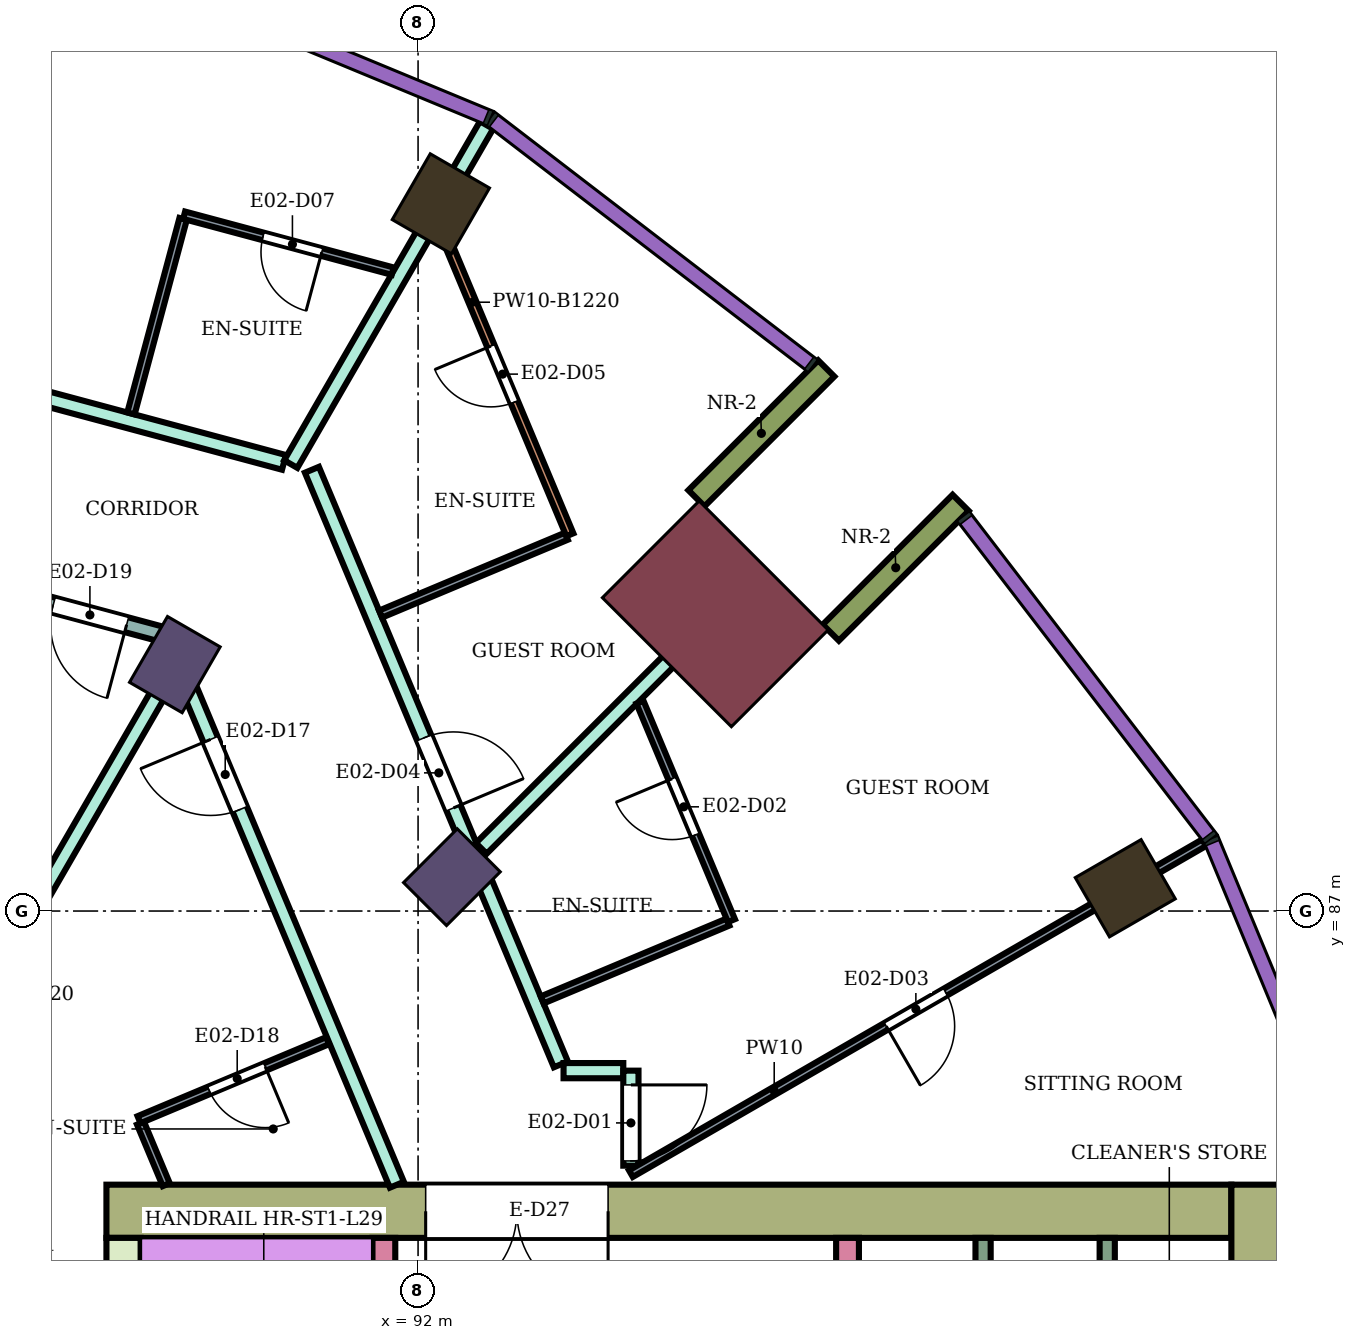
"""IFC4 building model, lengths in metres.
Left out: names, types, materials, properties, quantities, classifications, styles, units other than length and angle.
Written with IfcOpenShell. Run it as: python <this file> out.ifc"""

import sys

from ifc_helpers import new_model, si_unit, direction, frame, frame_2d, origin, origin_2d, place, context, subcontext, project, spatial, rectangle, extrude, element, fill, save


model = new_model("IFC4")
c1 = context("Model", 3, precision=1e-05, world=origin(), true_north=direction((0.0, 1.0)))
c2 = subcontext(c1, "Body", "Model", "MODEL_VIEW")
j1 = project(units=[si_unit("LENGTHUNIT", "METRE"), si_unit("PLANEANGLEUNIT", "RADIAN")], contexts=[c1])
p1 = place(None, origin())
s1 = spatial("IfcSite", under=j1, at=p1, CompositionType="ELEMENT")
p2 = place(p1, origin())
s2 = spatial("IfcBuilding", under=s1, at=p2, CompositionType="ELEMENT")
p3 = place(p2, frame((0.0, 0.0, 126.3)))
s3 = spatial("IfcBuildingStorey", under=s2, at=p3, CompositionType="ELEMENT", Elevation=126.3)
for number, where, z_axis, x_axis in (
    (1, (101.304, 87.3, 0.0), (0.0, 0.0, 1.0), (0.866, 0.5, 0.0)),
    (2, (92.3, 96.304, 0.0), (0.0, 0.0, 1.0), (0.5, 0.866, 0.0)),
):
    element("IfcColumn", number, at=place(p3, frame(where, z_axis=z_axis, x_axis=x_axis)), inside=s3, PredefinedType="COLUMN", context=c2, shape_type="SweptSolid", body=[
        extrude(rectangle(XDim=1.0, YDim=0.9, at=origin_2d()), origin(), (0.0, 0.0, 1.0), 3.9),
    ])
for number, where, z_axis, x_axis in (
    (3, (92.445, 87.445, 0.0), (0.0, 0.0, 1.0), (0.707, 0.707, 0.0)),
    (4, (88.8, 90.242, 0.0), (0.0, 0.0, 1.0), (0.5, 0.866, 0.0)),
):
    element("IfcColumn", number, at=place(p3, frame(where, z_axis=z_axis, x_axis=x_axis)), inside=s3, PredefinedType="COLUMN", context=c2, shape_type="SweptSolid", body=[
        extrude(rectangle(XDim=1.0, YDim=0.8, at=origin_2d()), origin(), (0.0, 0.0, 1.0), 3.9),
    ])
p4 = place(p3, frame((95.91, 90.91, 0.0), z_axis=(0.0, 0.0, 1.0), x_axis=(0.707106781187, 0.707106781187, 0.0)))
e5 = element("IfcColumn", 5, at=p4, inside=s3, PredefinedType="COLUMN", context=c2, shape_type="SweptSolid", body=[
    extrude(rectangle(XDim=1.8, YDim=2.4, at=origin_2d()), origin(), (0.0, 0.0, 1.0), 3.9),
])
p5 = place(p3, frame((87.9, 83.05, 0.0), z_axis=(0.0, 0.0, 1.0), x_axis=(1.0, 0.0, 0.0)))
e6 = element("IfcWall", 6, at=p5, inside=s3, PredefinedType="SHEAR", context=c2, shape_type="SweptSolid", body=[
    extrude(rectangle(XDim=14.8, YDim=0.7, at=frame_2d((7.4, 0.0))), origin(), (0.0, 0.0, 1.0), 3.58),
])
p6 = place(p5, frame((4.2, 0.0, 0.0)))
e7 = element("IfcOpeningElement", 7, at=p6, cuts=e6, PredefinedType="OPENING", context=c2, shape_type="SweptSolid", body=[
    extrude(rectangle(XDim=2.4, YDim=2.4, at=frame_2d((1.2, 1.2))), frame((0.0, 0.36, 0.0), z_axis=(0.0, -1.0, 0.0), x_axis=(1.0, 0.0, 0.0)), (0.0, 0.0, 1.0), 0.72),
])
p7 = place(p3, frame((88.125, 75.0, 0.0), z_axis=(0.0, 0.0, 1.0), x_axis=(0.0, 1.0, 0.0)))
e8 = element("IfcWall", 8, at=p7, inside=s3, PredefinedType="SHEAR", context=c2, shape_type="SweptSolid", body=[
    extrude(rectangle(XDim=7.7, YDim=0.45, at=frame_2d((3.85, 0.0))), origin(), (0.0, 0.0, 1.0), 3.58),
])
p8 = place(p3, frame((103.05, 66.6, 0.0), z_axis=(0.0, 0.0, 1.0), x_axis=(0.0, 1.0, 0.0)))
e9 = element("IfcWall", 9, at=p8, inside=s3, PredefinedType="SHEAR", context=c2, shape_type="SweptSolid", body=[
    extrude(rectangle(XDim=16.8, YDim=0.7, at=frame_2d((8.4, 0.0))), origin(), (0.0, 0.0, 1.0), 3.58),
])
p9 = place(p3, frame((91.55, 75.0, 0.0), z_axis=(0.0, 0.0, 1.0), x_axis=(0.0, 1.0, 0.0)))
e10 = element("IfcWall", 10, at=p9, inside=s3, PredefinedType="SHEAR", context=c2, shape_type="SweptSolid", body=[
    extrude(rectangle(XDim=7.7, YDim=0.3, at=frame_2d((3.85, 0.0))), origin(), (0.0, 0.0, 1.0), 3.58),
])
p10 = place(p9, frame((1.85, 0.0, 0.0)))
e11 = element("IfcOpeningElement", 11, at=p10, cuts=e10, PredefinedType="OPENING", context=c2, shape_type="SweptSolid", body=[
    extrude(rectangle(XDim=0.9, YDim=2.1, at=frame_2d((0.45, 1.05))), frame((0.0, 0.16, 0.0), z_axis=(0.0, -1.0, 0.0), x_axis=(1.0, 0.0, 0.0)), (0.0, 0.0, 1.0), 0.32),
])
p11 = place(p3, frame((97.65, 79.55, 0.0), z_axis=(0.0, 0.0, 1.0), x_axis=(0.0, 1.0, 0.0)))
e12 = element("IfcWall", 12, at=p11, inside=s3, PredefinedType="SHEAR", context=c2, shape_type="SweptSolid", body=[
    extrude(rectangle(XDim=3.15, YDim=0.3, at=frame_2d((1.575, 0.0))), origin(), (0.0, 0.0, 1.0), 3.58),
])
for number, where, z_axis, x_axis in (
    (13, (97.43, 90.662, 0.0), (0.0, 0.0, 1.0), (0.707, 0.707, 0.0)),
    (14, (95.662, 92.43, 0.0), (0.0, 0.0, 1.0), (0.707, 0.707, 0.0)),
):
    element("IfcWall", number, at=place(p3, frame(where, z_axis=z_axis, x_axis=x_axis)), inside=s3, PredefinedType="NOTDEFINED", context=c2, shape_type="SweptSolid", body=[
        extrude(rectangle(XDim=2.416, YDim=0.3, at=frame_2d((1.208, 0.0))), origin(), (0.0, 0.0, 1.0), 3.9),
    ])
p12 = place(p3, frame((80.0, 92.954, 0.0), z_axis=(0.0, 0.0, 1.0), x_axis=(0.96592536278, -0.258820774936, 0.0)))
e15 = element("IfcWall", 15, at=p12, inside=s3, PredefinedType="PARTITIONING", context=c2, shape_type="SweptSolid", body=[
    extrude(rectangle(XDim=8.934, YDim=0.2, at=frame_2d((4.467, 0.0))), origin(), (0.0, 0.0, 1.0), 3.08),
])
p13 = place(p12, frame((7.454, 0.0, 0.0)))
e16 = element("IfcOpeningElement", 16, at=p13, cuts=e15, PredefinedType="OPENING", context=c2, shape_type="SweptSolid", body=[
    extrude(rectangle(XDim=1.0, YDim=2.1, at=frame_2d((0.5, 1.05))), frame((0.0, 0.11, 0.0), z_axis=(0.0, -1.0, 0.0), x_axis=(1.0, 0.0, 0.0)), (0.0, 0.0, 1.0), 0.22),
])
p14 = place(p3, frame((80.0, 95.648, 0.0), z_axis=(0.0, 0.0, 1.0), x_axis=(0.965852259202, -0.259093445292, 0.0)))
e17 = element("IfcWall", 17, at=p14, inside=s3, PredefinedType="PARTITIONING", context=c2, shape_type="SweptSolid", body=[
    extrude(rectangle(XDim=10.597, YDim=0.2, at=frame_2d((5.298, 0.0))), origin(), (0.0, 0.0, 1.0), 3.45),
])
p15 = place(p14, frame((1.0, 0.0, 0.0)))
e18 = element("IfcOpeningElement", 18, at=p15, cuts=e17, PredefinedType="OPENING", context=c2, shape_type="SweptSolid", body=[
    extrude(rectangle(XDim=1.0, YDim=2.1, at=frame_2d((0.5, 1.05))), frame((0.0, 0.11, 0.0), z_axis=(0.0, -1.0, 0.0), x_axis=(1.0, 0.0, 0.0)), (0.0, 0.0, 1.0), 0.22),
])
p16 = place(p3, frame((83.85, 81.667, 0.0), z_axis=(0.0, 0.0, 1.0), x_axis=(0.500092047414, 0.865972253663, 0.0)))
e19 = element("IfcWall", 19, at=p16, inside=s3, PredefinedType="PARTITIONING", context=c2, shape_type="SweptSolid", body=[
    extrude(rectangle(XDim=9.778, YDim=0.2, at=frame_2d((4.889, 0.0))), origin(), (0.0, 0.0, 1.0), 3.45),
])
p17 = place(p3, frame((88.698, 90.624, 0.0), z_axis=(0.0, 0.0, 1.0), x_axis=(0.386027055918, -0.922487459047, 0.0)))
e20 = element("IfcWall", 20, at=p17, inside=s3, PredefinedType="PARTITIONING", context=c2, shape_type="SweptSolid", body=[
    extrude(rectangle(XDim=7.832, YDim=0.2, at=frame_2d((3.916, 0.0))), origin(), (0.0, 0.0, 1.0), 3.45),
])
p18 = place(p17, frame((1.482, 0.0, 0.0)))
e21 = element("IfcOpeningElement", 21, at=p18, cuts=e20, PredefinedType="OPENING", context=c2, shape_type="SweptSolid", body=[
    extrude(rectangle(XDim=1.0, YDim=2.1, at=frame_2d((0.5, 1.05))), frame((0.0, 0.11, 0.0), z_axis=(0.0, -1.0, 0.0), x_axis=(1.0, 0.0, 0.0)), (0.0, 0.0, 1.0), 0.22),
])
p19 = place(p3, frame((90.325, 92.88, 0.0), z_axis=(0.0, 0.0, 1.0), x_axis=(0.500084891114, 0.865976386329, 0.0)))
e22 = element("IfcWall", 22, at=p19, inside=s3, PredefinedType="PARTITIONING", context=c2, shape_type="SweptSolid", body=[
    extrude(rectangle(XDim=5.15, YDim=0.2, at=frame_2d((2.575, 0.0))), origin(), (0.0, 0.0, 1.0), 3.45),
])
p20 = place(p3, frame((90.604, 92.805, 0.0), z_axis=(0.0, 0.0, 1.0), x_axis=(0.386199042801, -0.922415470024, 0.0)))
e23 = element("IfcWall", 23, at=p20, inside=s3, PredefinedType="PARTITIONING", context=c2, shape_type="SweptSolid", body=[
    extrude(rectangle(XDim=8.48, YDim=0.2, at=frame_2d((4.24, 0.0))), origin(), (0.0, 0.0, 1.0), 3.45),
])
p21 = place(p20, frame((3.823, 0.0, 0.0)))
e24 = element("IfcOpeningElement", 24, at=p21, cuts=e23, PredefinedType="OPENING", context=c2, shape_type="SweptSolid", body=[
    extrude(rectangle(XDim=1.0, YDim=2.1, at=frame_2d((0.5, 1.05))), frame((0.0, 0.11, 0.0), z_axis=(0.0, -1.0, 0.0), x_axis=(1.0, 0.0, 0.0)), (0.0, 0.0, 1.0), 0.22),
])
p22 = place(p3, frame((92.832, 87.825, 0.0), z_axis=(0.0, 0.0, 1.0), x_axis=(0.707275688599, 0.706937833418, 0.0)))
e25 = element("IfcWall", 25, at=p22, inside=s3, PredefinedType="PARTITIONING", context=c2, shape_type="SweptSolid", body=[
    extrude(rectangle(XDim=5.058, YDim=0.2, at=frame_2d((2.529, 0.0))), origin(), (0.0, 0.0, 1.0), 3.45),
])
p23 = place(p3, frame((93.914, 84.9, 0.0), z_axis=(0.0, 0.0, 1.0), x_axis=(1.0, 0.0, 0.0)))
e26 = element("IfcWall", 26, at=p23, inside=s3, PredefinedType="PARTITIONING", context=c2, shape_type="SweptSolid", body=[
    extrude(rectangle(XDim=0.786, YDim=0.2, at=frame_2d((0.393, 0.0))), origin(), (0.0, 0.0, 1.0), 3.45),
])
p24 = place(p3, frame((94.8, 83.65, 0.0), z_axis=(0.0, 0.0, 1.0), x_axis=(0.0, 1.0, 0.0)))
e27 = element("IfcWall", 27, at=p24, inside=s3, PredefinedType="PARTITIONING", context=c2, shape_type="SweptSolid", body=[
    extrude(rectangle(XDim=1.25, YDim=0.2, at=frame_2d((0.625, 0.0))), origin(), (0.0, 0.0, 1.0), 3.45),
])
p25 = place(p24, frame((0.062, 0.0, 0.0)))
e28 = element("IfcOpeningElement", 28, at=p25, cuts=e27, PredefinedType="OPENING", context=c2, shape_type="SweptSolid", body=[
    extrude(rectangle(XDim=1.0, YDim=2.1, at=frame_2d((0.5, 1.05))), frame((0.0, 0.11, 0.0), z_axis=(0.0, -1.0, 0.0), x_axis=(1.0, 0.0, 0.0)), (0.0, 0.0, 1.0), 0.22),
])
p26 = place(p3, frame((88.223, 93.547, 0.0), z_axis=(0.0, 0.0, 1.0), x_axis=(0.259021640683, 0.965871518194, 0.0)))
e29 = element("IfcWall", 29, at=p26, inside=s3, PredefinedType="PARTITIONING", context=c2, shape_type="SweptSolid", body=[
    extrude(rectangle(XDim=2.649, YDim=0.1, at=frame_2d((1.325, 0.0))), origin(), (0.0, 0.0, 1.0), 3.45),
])
p27 = place(p3, frame((88.348, 84.209, 0.0), z_axis=(0.0, 0.0, 1.0), x_axis=(0.386077497504, -0.922466349479, 0.0)))
e30 = element("IfcWall", 30, at=p27, inside=s3, PredefinedType="PARTITIONING", context=c2, shape_type="SweptSolid", body=[
    extrude(rectangle(XDim=0.877, YDim=0.1, at=frame_2d((0.438, 0.0))), origin(), (0.0, 0.0, 1.0), 3.45),
])
p28 = place(p3, frame((88.329, 84.255, 0.0), z_axis=(0.0, 0.0, 1.0), x_axis=(0.922320663728, 0.386425404522, 0.0)))
e31 = element("IfcWall", 31, at=p28, inside=s3, PredefinedType="PARTITIONING", context=c2, shape_type="SweptSolid", body=[
    extrude(rectangle(XDim=2.69, YDim=0.1, at=frame_2d((1.345, 0.0))), origin(), (0.0, 0.0, 1.0), 3.45),
])
p29 = place(p28, frame((1.0, 0.0, 0.0)))
e32 = element("IfcOpeningElement", 32, at=p29, cuts=e31, PredefinedType="OPENING", context=c2, shape_type="SweptSolid", body=[
    extrude(rectangle(XDim=0.8, YDim=2.1, at=frame_2d((0.4, 1.05))), frame((0.0, 0.06, 0.0), z_axis=(0.0, -1.0, 0.0), x_axis=(1.0, 0.0, 0.0)), (0.0, 0.0, 1.0), 0.12),
])
p30 = place(p3, frame((88.922, 96.154, 0.0), z_axis=(0.0, 0.0, 1.0), x_axis=(0.965887418767, -0.258962341408, 0.0)))
e33 = element("IfcWall", 33, at=p30, inside=s3, PredefinedType="PARTITIONING", context=c2, shape_type="SweptSolid", body=[
    extrude(rectangle(XDim=2.841, YDim=0.1, at=frame_2d((1.42, 0.0))), origin(), (0.0, 0.0, 1.0), 3.45),
])
p31 = place(p30, frame((1.075, 0.0, 0.0)))
e34 = element("IfcOpeningElement", 34, at=p31, cuts=e33, PredefinedType="OPENING", context=c2, shape_type="SweptSolid", body=[
    extrude(rectangle(XDim=0.8, YDim=2.1, at=frame_2d((0.4, 1.05))), frame((0.0, 0.06, 0.0), z_axis=(0.0, -1.0, 0.0), x_axis=(1.0, 0.0, 0.0)), (0.0, 0.0, 1.0), 0.12),
])
p32 = place(p3, frame((91.507, 90.907, 0.0), z_axis=(0.0, 0.0, 1.0), x_axis=(0.922344808264, 0.38636777126, 0.0)))
e35 = element("IfcWall", 35, at=p32, inside=s3, PredefinedType="PARTITIONING", context=c2, shape_type="SweptSolid", body=[
    extrude(rectangle(XDim=2.65, YDim=0.1, at=frame_2d((1.325, 0.0))), origin(), (0.0, 0.0, 1.0), 3.45),
])
p33 = place(p3, frame((92.289, 96.03, 0.0), z_axis=(0.0, 0.0, 1.0), x_axis=(0.386237487323, -0.922399373041, 0.0)))
e36 = element("IfcWall", 36, at=p33, inside=s3, PredefinedType="PARTITIONING", context=c2, shape_type="SweptSolid", body=[
    extrude(rectangle(XDim=4.423, YDim=0.1, at=frame_2d((2.211, 0.0))), origin(), (0.0, 0.0, 1.0), 2.68),
])
p34 = place(p33, frame((1.731, 0.0, 0.0)))
e37 = element("IfcOpeningElement", 37, at=p34, cuts=e36, PredefinedType="OPENING", context=c2, shape_type="SweptSolid", body=[
    extrude(rectangle(XDim=0.8, YDim=2.1, at=frame_2d((0.4, 1.05))), frame((0.0, 0.06, 0.0), z_axis=(0.0, -1.0, 0.0), x_axis=(1.0, 0.0, 0.0)), (0.0, 0.0, 1.0), 0.12),
])
p35 = place(p3, frame((93.633, 85.831, 0.0), z_axis=(0.0, 0.0, 1.0), x_axis=(0.922344808264, 0.38636777126, 0.0)))
e38 = element("IfcWall", 38, at=p35, inside=s3, PredefinedType="PARTITIONING", context=c2, shape_type="SweptSolid", body=[
    extrude(rectangle(XDim=2.65, YDim=0.1, at=frame_2d((1.325, 0.0))), origin(), (0.0, 0.0, 1.0), 3.45),
])
p36 = place(p3, frame((94.8, 83.545, 0.0), z_axis=(0.0, 0.0, 1.0), x_axis=(0.86602264145, 0.500004784474, 0.0)))
e39 = element("IfcWall", 39, at=p36, inside=s3, PredefinedType="PARTITIONING", context=c2, shape_type="SweptSolid", body=[
    extrude(rectangle(XDim=8.708, YDim=0.1, at=frame_2d((4.354, 0.0))), origin(), (0.0, 0.0, 1.0), 3.45),
])
p37 = place(p36, frame((3.879, 0.0, 0.0)))
e40 = element("IfcOpeningElement", 40, at=p37, cuts=e39, PredefinedType="OPENING", context=c2, shape_type="SweptSolid", body=[
    extrude(rectangle(XDim=0.9, YDim=2.1, at=frame_2d((0.45, 1.05))), frame((0.0, 0.06, 0.0), z_axis=(0.0, -1.0, 0.0), x_axis=(1.0, 0.0, 0.0)), (0.0, 0.0, 1.0), 0.12),
])
p38 = place(p3, frame((94.919, 89.748, 0.0), z_axis=(0.0, 0.0, 1.0), x_axis=(0.386255913529, -0.922391657196, 0.0)))
e41 = element("IfcWall", 41, at=p38, inside=s3, PredefinedType="PARTITIONING", context=c2, shape_type="SweptSolid", body=[
    extrude(rectangle(XDim=3.116, YDim=0.1, at=frame_2d((1.558, 0.0))), origin(), (0.0, 0.0, 1.0), 3.45),
])
p39 = place(p38, frame((1.093, 0.0, 0.0)))
e42 = element("IfcOpeningElement", 42, at=p39, cuts=e41, PredefinedType="OPENING", context=c2, shape_type="SweptSolid", body=[
    extrude(rectangle(XDim=0.8, YDim=2.1, at=frame_2d((0.4, 1.05))), frame((0.0, 0.06, 0.0), z_axis=(0.0, -1.0, 0.0), x_axis=(1.0, 0.0, 0.0)), (0.0, 0.0, 1.0), 0.12),
])
for number, where, z_axis, x_axis in (
    (43, (99.433, 79.85, 0.0), (0.0, 0.0, 1.0), (0.0, 1.0, 0.0)),
    (44, (101.067, 79.85, 0.0), (0.0, 0.0, 1.0), (0.0, 1.0, 0.0)),
):
    element("IfcWall", number, at=place(p3, frame(where, z_axis=z_axis, x_axis=x_axis)), inside=s3, PredefinedType="PARTITIONING", context=c2, shape_type="SweptSolid", body=[
        extrude(rectangle(XDim=2.85, YDim=0.2, at=frame_2d((1.425, 0.0))), origin(), (0.0, 0.0, 1.0), 3.58),
    ])
p40 = place(p25, frame((1.0, 0.0, 0.0), z_axis=(0.0, 0.0, 1.0), x_axis=(-1.0, 0.0, 0.0)))
e45 = element("IfcDoor", 45, at=p40, inside=s3, OperationType="SINGLE_SWING_LEFT", PredefinedType="DOOR", context=c2, shape_type="SweptSolid", body=[
    extrude(rectangle(XDim=1.0, YDim=2.1, at=frame_2d((0.5, 1.05))), frame((0.0, 0.025, 0.0), z_axis=(0.0, -1.0, 0.0), x_axis=(1.0, 0.0, 0.0)), (0.0, 0.0, 1.0), 0.05),
])
fill(e28, e45)
p41 = place(p39, frame((0.8, 0.0, 0.0), z_axis=(0.0, 0.0, 1.0), x_axis=(-1.0, 0.0, 0.0)))
e46 = element("IfcDoor", 46, at=p41, inside=s3, OperationType="SINGLE_SWING_RIGHT", PredefinedType="DOOR", context=c2, shape_type="SweptSolid", body=[
    extrude(rectangle(XDim=0.8, YDim=2.1, at=frame_2d((0.4, 1.05))), frame((0.0, 0.025, 0.0), z_axis=(0.0, -1.0, 0.0), x_axis=(1.0, 0.0, 0.0)), (0.0, 0.0, 1.0), 0.05),
])
fill(e42, e46)
p42 = place(p37, frame((0.9, 0.0, 0.0), z_axis=(0.0, 0.0, 1.0), x_axis=(-1.0, 0.0, 0.0)))
e47 = element("IfcDoor", 47, at=p42, inside=s3, OperationType="SINGLE_SWING_RIGHT", PredefinedType="DOOR", context=c2, shape_type="SweptSolid", body=[
    extrude(rectangle(XDim=0.9, YDim=2.1, at=frame_2d((0.45, 1.05))), frame((0.0, 0.025, 0.0), z_axis=(0.0, -1.0, 0.0), x_axis=(1.0, 0.0, 0.0)), (0.0, 0.0, 1.0), 0.05),
])
fill(e40, e47)
p43 = place(p21, origin())
e48 = element("IfcDoor", 48, at=p43, inside=s3, OperationType="SINGLE_SWING_RIGHT", PredefinedType="DOOR", context=c2, shape_type="SweptSolid", body=[
    extrude(rectangle(XDim=1.0, YDim=2.1, at=frame_2d((0.5, 1.05))), frame((0.0, 0.025, 0.0), z_axis=(0.0, -1.0, 0.0), x_axis=(1.0, 0.0, 0.0)), (0.0, 0.0, 1.0), 0.05),
])
fill(e24, e48)
p44 = place(p34, frame((0.8, 0.0, 0.0), z_axis=(0.0, 0.0, 1.0), x_axis=(-1.0, 0.0, 0.0)))
e49 = element("IfcDoor", 49, at=p44, inside=s3, OperationType="SINGLE_SWING_RIGHT", PredefinedType="DOOR", context=c2, shape_type="SweptSolid", body=[
    extrude(rectangle(XDim=0.8, YDim=2.1, at=frame_2d((0.4, 1.05))), frame((0.0, 0.025, 0.0), z_axis=(0.0, -1.0, 0.0), x_axis=(1.0, 0.0, 0.0)), (0.0, 0.0, 1.0), 0.05),
])
fill(e37, e49)
p45 = place(p31, frame((0.8, 0.0, 0.0), z_axis=(0.0, 0.0, 1.0), x_axis=(-1.0, 0.0, 0.0)))
e50 = element("IfcDoor", 50, at=p45, inside=s3, OperationType="SINGLE_SWING_LEFT", PredefinedType="DOOR", context=c2, shape_type="SweptSolid", body=[
    extrude(rectangle(XDim=0.8, YDim=2.1, at=frame_2d((0.4, 1.05))), frame((0.0, 0.025, 0.0), z_axis=(0.0, -1.0, 0.0), x_axis=(1.0, 0.0, 0.0)), (0.0, 0.0, 1.0), 0.05),
])
fill(e34, e50)
p46 = place(p18, frame((1.0, 0.0, 0.0), z_axis=(0.0, 0.0, 1.0), x_axis=(-1.0, 0.0, 0.0)))
e51 = element("IfcDoor", 51, at=p46, inside=s3, OperationType="SINGLE_SWING_RIGHT", PredefinedType="DOOR", context=c2, shape_type="SweptSolid", body=[
    extrude(rectangle(XDim=1.0, YDim=2.1, at=frame_2d((0.5, 1.05))), frame((0.0, 0.025, 0.0), z_axis=(0.0, -1.0, 0.0), x_axis=(1.0, 0.0, 0.0)), (0.0, 0.0, 1.0), 0.05),
])
fill(e21, e51)
p47 = place(p29, frame((0.8, 0.0, 0.0), z_axis=(0.0, 0.0, 1.0), x_axis=(-1.0, 0.0, 0.0)))
e52 = element("IfcDoor", 52, at=p47, inside=s3, OperationType="SINGLE_SWING_LEFT", PredefinedType="DOOR", context=c2, shape_type="SweptSolid", body=[
    extrude(rectangle(XDim=0.8, YDim=2.1, at=frame_2d((0.4, 1.05))), frame((0.0, 0.025, 0.0), z_axis=(0.0, -1.0, 0.0), x_axis=(1.0, 0.0, 0.0)), (0.0, 0.0, 1.0), 0.05),
])
fill(e32, e52)
p48 = place(p13, frame((1.0, 0.0, 0.0), z_axis=(0.0, 0.0, 1.0), x_axis=(-1.0, 0.0, 0.0)))
e53 = element("IfcDoor", 53, at=p48, inside=s3, OperationType="SINGLE_SWING_LEFT", PredefinedType="DOOR", context=c2, shape_type="SweptSolid", body=[
    extrude(rectangle(XDim=1.0, YDim=2.1, at=frame_2d((0.5, 1.05))), frame((0.0, 0.025, 0.0), z_axis=(0.0, -1.0, 0.0), x_axis=(1.0, 0.0, 0.0)), (0.0, 0.0, 1.0), 0.05),
])
fill(e16, e53)
p49 = place(p6, frame((2.4, 0.0, 0.0), z_axis=(0.0, 0.0, 1.0), x_axis=(-1.0, 0.0, 0.0)))
e54 = element("IfcDoor", 54, at=p49, inside=s3, OperationType="DOUBLE_DOOR_SINGLE_SWING", PredefinedType="DOOR", context=c2, shape_type="SweptSolid", body=[
    extrude(rectangle(XDim=2.4, YDim=2.4, at=frame_2d((1.2, 1.2))), frame((0.0, 0.025, 0.0), z_axis=(0.0, -1.0, 0.0), x_axis=(1.0, 0.0, 0.0)), (0.0, 0.0, 1.0), 0.05),
])
fill(e7, e54)
save(model, sys.argv[1])
